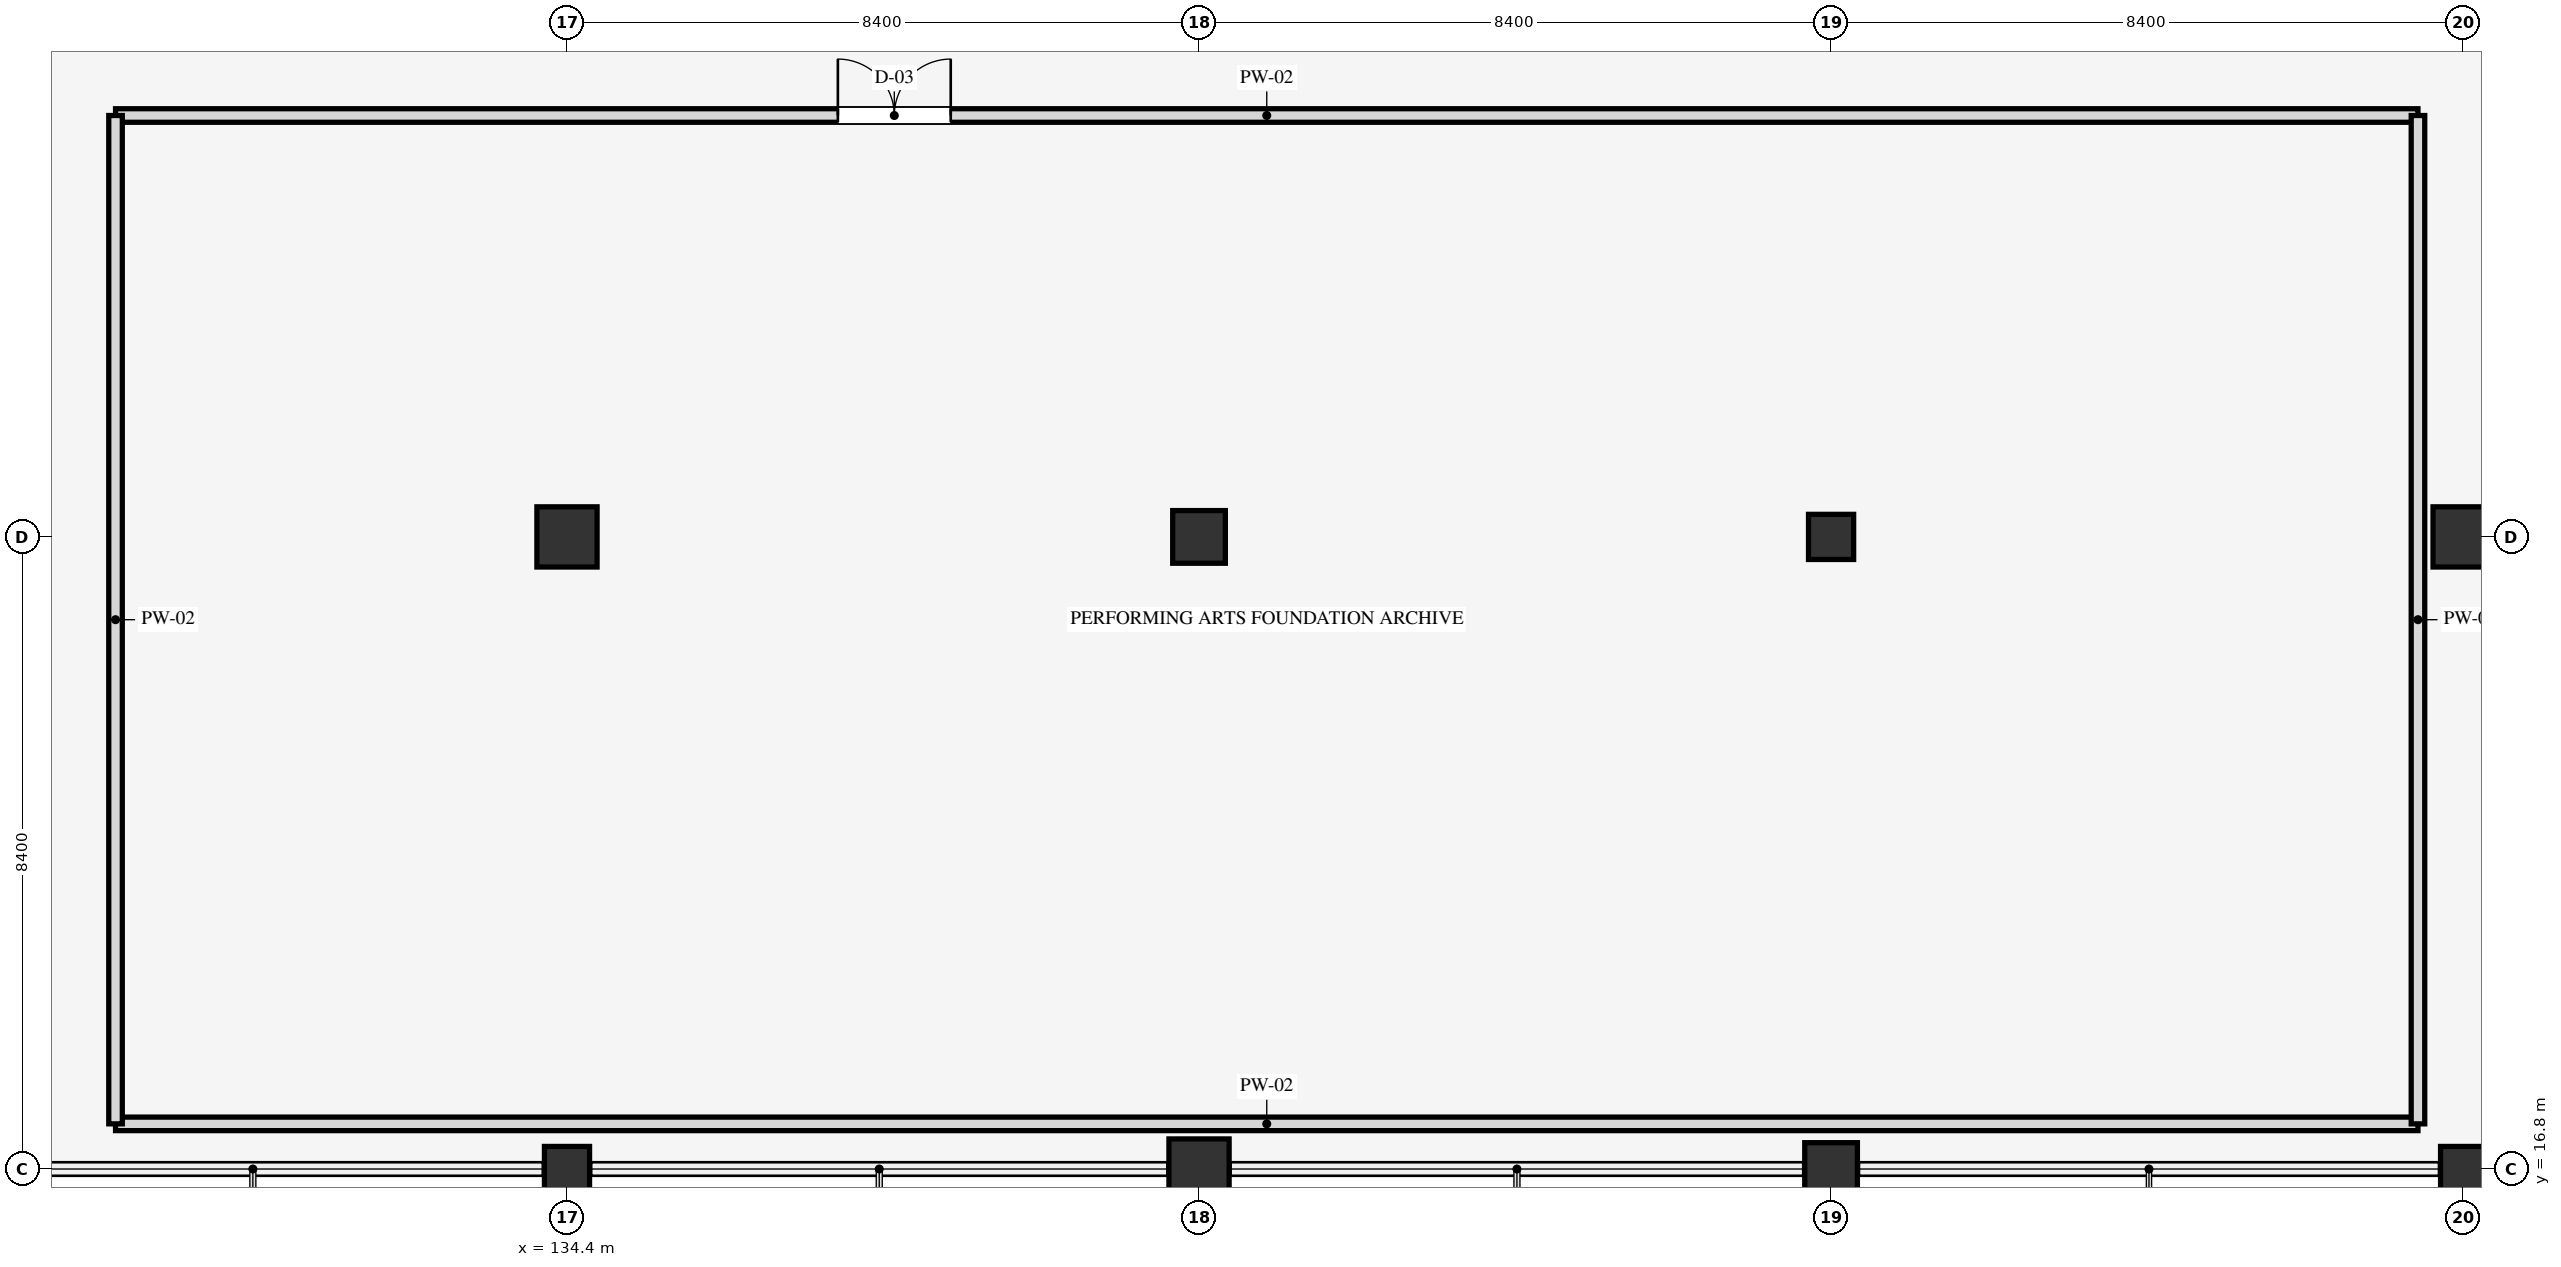
"""IFC4 building model, lengths in metres.
Left out: names, types, materials, properties, quantities, classifications, styles, units other than length and angle.
Written with IfcOpenShell. Run it as: python <this file> out.ifc"""

import sys

from ifc_helpers import new_model, si_unit, direction, frame, frame_2d, origin, origin_2d, place, context, subcontext, project, spatial, rectangle, extrude, element, fill, save


model = new_model("IFC4")
c1 = context("Model", 3, precision=1e-05, world=origin(), true_north=direction((0.0, 1.0)))
c2 = subcontext(c1, "Body", "Model", "MODEL_VIEW")
j1 = project(units=[si_unit("LENGTHUNIT", "METRE"), si_unit("PLANEANGLEUNIT", "RADIAN")], contexts=[c1])
p1 = place(None, origin())
s1 = spatial("IfcSite", under=j1, at=p1, CompositionType="ELEMENT")
p2 = place(p1, origin())
s2 = spatial("IfcBuilding", under=s1, at=p2, CompositionType="ELEMENT")
p3 = place(p2, frame((0.0, 0.0, 18.9)))
s3 = spatial("IfcBuildingStorey", under=s2, at=p3, CompositionType="ELEMENT", Elevation=18.9)
p4 = place(p3, frame((134.4, 16.8, 0.0), z_axis=(0.0, 0.0, 1.0), x_axis=(1.0, 0.0, 0.0)))
e1 = element("IfcColumn", 1, at=p4, inside=s3, PredefinedType="COLUMN", context=c2, shape_type="SweptSolid", body=[
    extrude(rectangle(XDim=0.6, YDim=0.6, at=origin_2d()), origin(), (0.0, 0.0, 1.0), 4.5),
])
for number, where, z_axis, x_axis in (
    (2, (134.4, 25.2, 0.0), (0.0, 0.0, 1.0), (1.0, 0.0, 0.0)),
    (3, (142.8, 16.8, 0.0), (0.0, 0.0, 1.0), (1.0, 0.0, 0.0)),
):
    element("IfcColumn", number, at=place(p3, frame(where, z_axis=z_axis, x_axis=x_axis)), inside=s3, PredefinedType="COLUMN", context=c2, shape_type="SweptSolid", body=[
        extrude(rectangle(XDim=0.8, YDim=0.8, at=origin_2d()), origin(), (0.0, 0.0, 1.0), 4.5),
    ])
for number, where, z_axis, x_axis in (
    (4, (142.8, 25.2, 0.0), (0.0, 0.0, 1.0), (1.0, 0.0, 0.0)),
    (5, (151.2, 16.8, 0.0), (0.0, 0.0, 1.0), (1.0, 0.0, 0.0)),
):
    element("IfcColumn", number, at=place(p3, frame(where, z_axis=z_axis, x_axis=x_axis)), inside=s3, PredefinedType="COLUMN", context=c2, shape_type="SweptSolid", body=[
        extrude(rectangle(XDim=0.7, YDim=0.7, at=origin_2d()), origin(), (0.0, 0.0, 1.0), 4.5),
    ])
for number, where, z_axis, x_axis in (
    (6, (151.2, 25.2, 0.0), (0.0, 0.0, 1.0), (1.0, 0.0, 0.0)),
    (7, (159.6, 16.8, 0.0), (0.0, 0.0, 1.0), (1.0, 0.0, 0.0)),
):
    element("IfcColumn", number, at=place(p3, frame(where, z_axis=z_axis, x_axis=x_axis)), inside=s3, PredefinedType="COLUMN", context=c2, shape_type="SweptSolid", body=[
        extrude(rectangle(XDim=0.6, YDim=0.6, at=origin_2d()), origin(), (0.0, 0.0, 1.0), 4.5),
    ])
p5 = place(p3, frame((159.6, 25.2, 0.0), z_axis=(0.0, 0.0, 1.0), x_axis=(1.0, 0.0, 0.0)))
e8 = element("IfcColumn", 8, at=p5, inside=s3, PredefinedType="COLUMN", context=c2, shape_type="SweptSolid", body=[
    extrude(rectangle(XDim=0.8, YDim=0.8, at=origin_2d()), origin(), (0.0, 0.0, 1.0), 4.5),
])
p6 = place(p3, frame((128.4, 17.4, 0.0), z_axis=(0.0, 0.0, 1.0), x_axis=(1.0, 0.0, 0.0)))
e9 = element("IfcWall", 9, at=p6, inside=s3, PredefinedType="PARTITIONING", context=c2, shape_type="SweptSolid", body=[
    extrude(rectangle(XDim=30.6, YDim=0.18, at=frame_2d((15.3, 0.0))), origin(), (0.0, 0.0, 1.0), 3.54),
])
p7 = place(p3, frame((128.4, 30.8, 0.0), z_axis=(0.0, 0.0, 1.0), x_axis=(1.0, 0.0, 0.0)))
e10 = element("IfcWall", 10, at=p7, inside=s3, PredefinedType="PARTITIONING", context=c2, shape_type="SweptSolid", body=[
    extrude(rectangle(XDim=30.6, YDim=0.18, at=frame_2d((15.3, 0.0))), origin(), (0.0, 0.0, 1.0), 3.54),
])
p8 = place(p7, frame((9.6, 0.0, 0.0)))
e11 = element("IfcOpeningElement", 11, at=p8, cuts=e10, PredefinedType="OPENING", context=c2, shape_type="SweptSolid", body=[
    extrude(rectangle(XDim=1.5, YDim=2.2, at=frame_2d((0.75, 1.1))), frame((0.0, 0.1, 0.0), z_axis=(0.0, -1.0, 0.0), x_axis=(1.0, 0.0, 0.0)), (0.0, 0.0, 1.0), 0.2),
])
for number, where, z_axis, x_axis in (
    (12, (128.4, 17.4, 0.0), (0.0, 0.0, 1.0), (0.0, 1.0, 0.0)),
    (13, (159.0, 17.4, 0.0), (0.0, 0.0, 1.0), (0.0, 1.0, 0.0)),
):
    element("IfcWall", number, at=place(p3, frame(where, z_axis=z_axis, x_axis=x_axis)), inside=s3, PredefinedType="PARTITIONING", context=c2, shape_type="SweptSolid", body=[
        extrude(rectangle(XDim=13.4, YDim=0.18, at=frame_2d((6.7, 0.0))), origin(), (0.0, 0.0, 1.0), 3.54),
    ])
p9 = place(p8, origin())
e14 = element("IfcDoor", 14, at=p9, inside=s3, OperationType="DOUBLE_DOOR_SINGLE_SWING", PredefinedType="DOOR", context=c2, shape_type="SweptSolid", body=[
    extrude(rectangle(XDim=1.5, YDim=2.2, at=frame_2d((0.75, 1.1))), frame((0.0, 0.025, 0.0), z_axis=(0.0, -1.0, 0.0), x_axis=(1.0, 0.0, 0.0)), (0.0, 0.0, 1.0), 0.05),
])
fill(e11, e14)
save(model, sys.argv[1])
